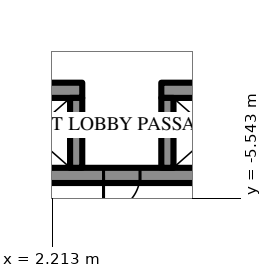
"""IFC4 building model, lengths in metres.
Left out: names, types, materials, properties, quantities, classifications, styles, units other than length and angle.
Written with IfcOpenShell. Run it as: python <this file> out.ifc"""

import sys

from ifc_helpers import new_model, si_unit, direction, frame, frame_2d, origin, place, context, subcontext, project, spatial, rectangle, extrude, element, fill, save


model = new_model("IFC4")
c1 = context("Model", 3, precision=1e-05, world=origin(), true_north=direction((0.0, 1.0)))
c2 = subcontext(c1, "Body", "Model", "MODEL_VIEW")
j1 = project(units=[si_unit("LENGTHUNIT", "METRE"), si_unit("PLANEANGLEUNIT", "RADIAN")], contexts=[c1])
p1 = place(None, origin())
s1 = spatial("IfcSite", under=j1, at=p1, CompositionType="ELEMENT")
p2 = place(p1, origin())
s2 = spatial("IfcBuilding", under=s1, at=p2, CompositionType="ELEMENT")
p3 = place(p2, origin())
s3 = spatial("IfcBuildingStorey", under=s2, at=p3, CompositionType="ELEMENT", Elevation=0.0)
p4 = place(p3, frame((11.7, -2.0, 0.0), z_axis=(0.0, 0.0, 1.0), x_axis=(-1.0, 0.0, 0.0)))
e1 = element("IfcWall", 1, at=p4, inside=s3, PredefinedType="SHEAR", context=c2, shape_type="SweptSolid", body=[
    extrude(rectangle(XDim=5.9, YDim=0.5, at=frame_2d((2.95, 0.0))), origin(), (0.0, 0.0, 1.0), 7.0),
])
p5 = place(p4, frame((0.6, 0.0, 0.0)))
e2 = element("IfcOpeningElement", 2, at=p5, cuts=e1, PredefinedType="OPENING", context=c2, shape_type="SweptSolid", body=[
    extrude(rectangle(XDim=1.2, YDim=2.2, at=frame_2d((0.6, 1.1))), frame((0.0, 0.26, 0.0), z_axis=(0.0, -1.0, 0.0), x_axis=(1.0, 0.0, 0.0)), (0.0, 0.0, 1.0), 0.52),
])
p6 = place(p3, frame((3.2, -2.0, 0.0), z_axis=(0.0, 0.0, 1.0), x_axis=(-1.0, 0.0, 0.0)))
e3 = element("IfcWall", 3, at=p6, inside=s3, PredefinedType="SHEAR", context=c2, shape_type="SweptSolid", body=[
    extrude(rectangle(XDim=14.9, YDim=0.5, at=frame_2d((7.45, 0.0))), origin(), (0.0, 0.0, 1.0), 7.0),
])
p7 = place(p6, frame((1.15, 0.0, 0.0)))
e4 = element("IfcOpeningElement", 4, at=p7, cuts=e3, PredefinedType="OPENING", context=c2, shape_type="SweptSolid", body=[
    extrude(rectangle(XDim=1.1, YDim=2.2, at=frame_2d((0.55, 1.1))), frame((0.0, 0.26, 0.0), z_axis=(0.0, -1.0, 0.0), x_axis=(1.0, 0.0, 0.0)), (0.0, 0.0, 1.0), 0.52),
])
p8 = place(p6, frame((4.15, 0.0, 0.0)))
e5 = element("IfcOpeningElement", 5, at=p8, cuts=e3, PredefinedType="OPENING", context=c2, shape_type="SweptSolid", body=[
    extrude(rectangle(XDim=1.1, YDim=2.2, at=frame_2d((0.55, 1.1))), frame((0.0, 0.26, 0.0), z_axis=(0.0, -1.0, 0.0), x_axis=(1.0, 0.0, 0.0)), (0.0, 0.0, 1.0), 0.52),
])
p9 = place(p6, frame((7.15, 0.0, 0.0)))
e6 = element("IfcOpeningElement", 6, at=p9, cuts=e3, PredefinedType="OPENING", context=c2, shape_type="SweptSolid", body=[
    extrude(rectangle(XDim=1.1, YDim=2.2, at=frame_2d((0.55, 1.1))), frame((0.0, 0.26, 0.0), z_axis=(0.0, -1.0, 0.0), x_axis=(1.0, 0.0, 0.0)), (0.0, 0.0, 1.0), 0.52),
])
p10 = place(p6, frame((10.15, 0.0, 0.0)))
e7 = element("IfcOpeningElement", 7, at=p10, cuts=e3, PredefinedType="OPENING", context=c2, shape_type="SweptSolid", body=[
    extrude(rectangle(XDim=1.1, YDim=2.2, at=frame_2d((0.55, 1.1))), frame((0.0, 0.26, 0.0), z_axis=(0.0, -1.0, 0.0), x_axis=(1.0, 0.0, 0.0)), (0.0, 0.0, 1.0), 0.52),
])
p11 = place(p6, frame((13.1, 0.0, 0.0)))
e8 = element("IfcOpeningElement", 8, at=p11, cuts=e3, PredefinedType="OPENING", context=c2, shape_type="SweptSolid", body=[
    extrude(rectangle(XDim=1.2, YDim=2.2, at=frame_2d((0.6, 1.1))), frame((0.0, 0.26, 0.0), z_axis=(0.0, -1.0, 0.0), x_axis=(1.0, 0.0, 0.0)), (0.0, 0.0, 1.0), 0.52),
])
p12 = place(p3, frame((11.7, -4.8, 0.0), z_axis=(0.0, 0.0, 1.0), x_axis=(-1.0, 0.0, 0.0)))
e9 = element("IfcWall", 9, at=p12, inside=s3, PredefinedType="SHEAR", context=c2, shape_type="SweptSolid", body=[
    extrude(rectangle(XDim=23.4, YDim=0.5, at=frame_2d((11.7, 0.0))), origin(), (0.0, 0.0, 1.0), 7.0),
])
p13 = place(p12, frame((6.6, 0.0, 0.0)))
e10 = element("IfcOpeningElement", 10, at=p13, cuts=e9, PredefinedType="OPENING", context=c2, shape_type="SweptSolid", body=[
    extrude(rectangle(XDim=1.2, YDim=2.2, at=frame_2d((0.6, 1.1))), frame((0.0, 0.26, 0.0), z_axis=(0.0, -1.0, 0.0), x_axis=(1.0, 0.0, 0.0)), (0.0, 0.0, 1.0), 0.52),
])
p14 = place(p12, frame((3.6, 0.0, 0.0)))
e11 = element("IfcOpeningElement", 11, at=p14, cuts=e9, PredefinedType="OPENING", context=c2, shape_type="SweptSolid", body=[
    extrude(rectangle(XDim=1.2, YDim=2.2, at=frame_2d((0.6, 1.1))), frame((0.0, 0.26, 0.0), z_axis=(0.0, -1.0, 0.0), x_axis=(1.0, 0.0, 0.0)), (0.0, 0.0, 1.0), 0.52),
])
for number, where, z_axis, x_axis in (
    (12, (6.0, -2.25, 0.0), (0.0, 0.0, 1.0), (0.0, -1.0, 0.0)),
    (13, (3.0, -2.25, 0.0), (0.0, 0.0, 1.0), (0.0, -1.0, 0.0)),
):
    element("IfcWall", number, at=place(p3, frame(where, z_axis=z_axis, x_axis=x_axis)), inside=s3, PredefinedType="SHEAR", context=c2, shape_type="SweptSolid", body=[
        extrude(rectangle(XDim=2.3, YDim=0.4, at=frame_2d((1.15, 0.0))), origin(), (0.0, 0.0, 1.0), 7.0),
    ])
p15 = place(p13, origin())
e14 = element("IfcDoor", 14, at=p15, inside=s3, OperationType="SINGLE_SWING_LEFT", PredefinedType="DOOR", context=c2, shape_type="SweptSolid", body=[
    extrude(rectangle(XDim=1.2, YDim=2.2, at=frame_2d((0.6, 1.1))), frame((0.0, 0.025, 0.0), z_axis=(0.0, -1.0, 0.0), x_axis=(1.0, 0.0, 0.0)), (0.0, 0.0, 1.0), 0.05),
])
fill(e10, e14)
save(model, sys.argv[1])
